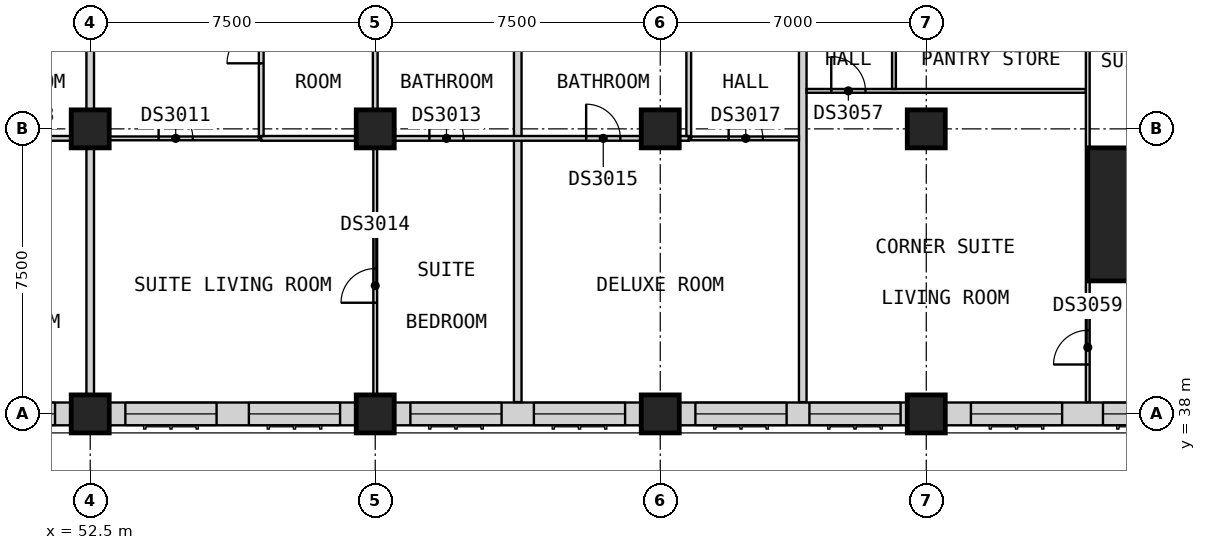
"""IFC4 building model, lengths in metres.
Left out: names, types, materials, properties, quantities, classifications, styles, units other than length and angle.
Written with IfcOpenShell. Run it as: python <this file> out.ifc"""

import sys

from ifc_helpers import new_model, si_unit, direction, frame, frame_2d, origin, origin_2d, place, context, subcontext, project, spatial, rectangle, extrude, element, fill, save


model = new_model("IFC4")
c1 = context("Model", 3, precision=1e-05, world=origin(), true_north=direction((0.0, 1.0)))
c2 = subcontext(c1, "Body", "Model", "MODEL_VIEW")
j1 = project(units=[si_unit("LENGTHUNIT", "METRE"), si_unit("PLANEANGLEUNIT", "RADIAN")], contexts=[c1])
p1 = place(None, origin())
s1 = spatial("IfcSite", under=j1, at=p1, CompositionType="ELEMENT")
p2 = place(p1, origin())
s2 = spatial("IfcBuilding", under=s1, at=p2, CompositionType="ELEMENT")
p3 = place(p2, frame((0.0, 0.0, 137.4)))
s3 = spatial("IfcBuildingStorey", under=s2, at=p3, CompositionType="ELEMENT", Elevation=137.4)
for number, where, z_axis, x_axis in (
    (1, (52.5, 38.0, 0.0), (0.0, 0.0, 1.0), (1.0, 0.0, 0.0)),
    (2, (52.5, 45.5, 0.0), (0.0, 0.0, 1.0), (1.0, 0.0, 0.0)),
    (3, (60.0, 38.0, 0.0), (0.0, 0.0, 1.0), (1.0, 0.0, 0.0)),
    (4, (60.0, 45.5, 0.0), (0.0, 0.0, 1.0), (1.0, 0.0, 0.0)),
    (5, (67.5, 38.0, 0.0), (0.0, 0.0, 1.0), (1.0, 0.0, 0.0)),
    (6, (67.5, 45.5, 0.0), (0.0, 0.0, 1.0), (1.0, 0.0, 0.0)),
    (7, (74.5, 38.0, 0.0), (0.0, 0.0, 1.0), (1.0, 0.0, 0.0)),
    (8, (74.5, 45.5, 0.0), (0.0, 0.0, 1.0), (1.0, 0.0, 0.0)),
):
    element("IfcColumn", number, at=place(p3, frame(where, z_axis=z_axis, x_axis=x_axis)), inside=s3, PredefinedType="COLUMN", context=c2, shape_type="SweptSolid", body=[
        extrude(rectangle(XDim=1.0, YDim=1.0, at=origin_2d()), origin(), (0.0, 0.0, 1.0), 3.6),
    ])
p4 = place(p3, frame((80.5, 43.25, 0.0), z_axis=(0.0, 0.0, 1.0), x_axis=(1.0, 0.0, 0.0)))
e9 = element("IfcColumn", 9, at=p4, inside=s3, PredefinedType="COLUMN", context=c2, shape_type="SweptSolid", body=[
    extrude(rectangle(XDim=3.5, YDim=3.5, at=origin_2d()), origin(), (0.0, 0.0, 1.0), 3.6),
])
p5 = place(p3, frame((45.5, 38.0, 0.0), z_axis=(0.0, 0.0, 1.0), x_axis=(1.0, 0.0, 0.0)))
e10 = element("IfcWall", 10, at=p5, inside=s3, PredefinedType="SOLIDWALL", context=c2, shape_type="SweptSolid", body=[
    extrude(rectangle(XDim=6.5, YDim=0.6, at=frame_2d((3.25, 0.0))), origin(), (0.0, 0.0, 1.0), 2.85),
])
p6 = place(p5, frame((0.425, 0.0, 0.8)))
e11 = element("IfcOpeningElement", 11, at=p6, cuts=e10, PredefinedType="OPENING", context=c2, shape_type="SweptSolid", body=[
    extrude(rectangle(XDim=2.4, YDim=1.8, at=frame_2d((1.2, 0.9))), frame((0.0, 0.31, 0.0), z_axis=(0.0, -1.0, 0.0), x_axis=(1.0, 0.0, 0.0)), (0.0, 0.0, 1.0), 0.62),
])
p7 = place(p5, frame((3.675, 0.0, 0.8)))
e12 = element("IfcOpeningElement", 12, at=p7, cuts=e10, PredefinedType="OPENING", context=c2, shape_type="SweptSolid", body=[
    extrude(rectangle(XDim=2.4, YDim=1.8, at=frame_2d((1.2, 0.9))), frame((0.0, 0.31, 0.0), z_axis=(0.0, -1.0, 0.0), x_axis=(1.0, 0.0, 0.0)), (0.0, 0.0, 1.0), 0.62),
])
p8 = place(p3, frame((53.0, 38.0, 0.0), z_axis=(0.0, 0.0, 1.0), x_axis=(1.0, 0.0, 0.0)))
e13 = element("IfcWall", 13, at=p8, inside=s3, PredefinedType="SOLIDWALL", context=c2, shape_type="SweptSolid", body=[
    extrude(rectangle(XDim=6.5, YDim=0.6, at=frame_2d((3.25, 0.0))), origin(), (0.0, 0.0, 1.0), 2.85),
])
p9 = place(p8, frame((0.425, 0.0, 0.8)))
e14 = element("IfcOpeningElement", 14, at=p9, cuts=e13, PredefinedType="OPENING", context=c2, shape_type="SweptSolid", body=[
    extrude(rectangle(XDim=2.4, YDim=1.8, at=frame_2d((1.2, 0.9))), frame((0.0, 0.31, 0.0), z_axis=(0.0, -1.0, 0.0), x_axis=(1.0, 0.0, 0.0)), (0.0, 0.0, 1.0), 0.62),
])
p10 = place(p8, frame((3.675, 0.0, 0.8)))
e15 = element("IfcOpeningElement", 15, at=p10, cuts=e13, PredefinedType="OPENING", context=c2, shape_type="SweptSolid", body=[
    extrude(rectangle(XDim=2.4, YDim=1.8, at=frame_2d((1.2, 0.9))), frame((0.0, 0.31, 0.0), z_axis=(0.0, -1.0, 0.0), x_axis=(1.0, 0.0, 0.0)), (0.0, 0.0, 1.0), 0.62),
])
p11 = place(p3, frame((60.5, 38.0, 0.0), z_axis=(0.0, 0.0, 1.0), x_axis=(1.0, 0.0, 0.0)))
e16 = element("IfcWall", 16, at=p11, inside=s3, PredefinedType="SOLIDWALL", context=c2, shape_type="SweptSolid", body=[
    extrude(rectangle(XDim=6.5, YDim=0.6, at=frame_2d((3.25, 0.0))), origin(), (0.0, 0.0, 1.0), 2.85),
])
p12 = place(p11, frame((0.425, 0.0, 0.8)))
e17 = element("IfcOpeningElement", 17, at=p12, cuts=e16, PredefinedType="OPENING", context=c2, shape_type="SweptSolid", body=[
    extrude(rectangle(XDim=2.4, YDim=1.8, at=frame_2d((1.2, 0.9))), frame((0.0, 0.31, 0.0), z_axis=(0.0, -1.0, 0.0), x_axis=(1.0, 0.0, 0.0)), (0.0, 0.0, 1.0), 0.62),
])
p13 = place(p11, frame((3.675, 0.0, 0.8)))
e18 = element("IfcOpeningElement", 18, at=p13, cuts=e16, PredefinedType="OPENING", context=c2, shape_type="SweptSolid", body=[
    extrude(rectangle(XDim=2.4, YDim=1.8, at=frame_2d((1.2, 0.9))), frame((0.0, 0.31, 0.0), z_axis=(0.0, -1.0, 0.0), x_axis=(1.0, 0.0, 0.0)), (0.0, 0.0, 1.0), 0.62),
])
p14 = place(p3, frame((68.0, 38.0, 0.0), z_axis=(0.0, 0.0, 1.0), x_axis=(1.0, 0.0, 0.0)))
e19 = element("IfcWall", 19, at=p14, inside=s3, PredefinedType="SOLIDWALL", context=c2, shape_type="SweptSolid", body=[
    extrude(rectangle(XDim=6.0, YDim=0.6, at=frame_2d((3.0, 0.0))), origin(), (0.0, 0.0, 1.0), 2.85),
])
p15 = place(p14, frame((0.425, 0.0, 0.8)))
e20 = element("IfcOpeningElement", 20, at=p15, cuts=e19, PredefinedType="OPENING", context=c2, shape_type="SweptSolid", body=[
    extrude(rectangle(XDim=2.4, YDim=1.8, at=frame_2d((1.2, 0.9))), frame((0.0, 0.31, 0.0), z_axis=(0.0, -1.0, 0.0), x_axis=(1.0, 0.0, 0.0)), (0.0, 0.0, 1.0), 0.62),
])
p16 = place(p14, frame((3.425, 0.0, 0.8)))
e21 = element("IfcOpeningElement", 21, at=p16, cuts=e19, PredefinedType="OPENING", context=c2, shape_type="SweptSolid", body=[
    extrude(rectangle(XDim=2.4, YDim=1.8, at=frame_2d((1.2, 0.9))), frame((0.0, 0.31, 0.0), z_axis=(0.0, -1.0, 0.0), x_axis=(1.0, 0.0, 0.0)), (0.0, 0.0, 1.0), 0.62),
])
p17 = place(p3, frame((75.0, 38.0, 0.0), z_axis=(0.0, 0.0, 1.0), x_axis=(1.0, 0.0, 0.0)))
e22 = element("IfcWall", 22, at=p17, inside=s3, PredefinedType="SOLIDWALL", context=c2, shape_type="SweptSolid", body=[
    extrude(rectangle(XDim=7.25, YDim=0.6, at=frame_2d((3.625, 0.0))), origin(), (0.0, 0.0, 1.0), 2.85),
])
p18 = place(p17, frame((0.675, 0.0, 0.8)))
e23 = element("IfcOpeningElement", 23, at=p18, cuts=e22, PredefinedType="OPENING", context=c2, shape_type="SweptSolid", body=[
    extrude(rectangle(XDim=2.4, YDim=1.8, at=frame_2d((1.2, 0.9))), frame((0.0, 0.31, 0.0), z_axis=(0.0, -1.0, 0.0), x_axis=(1.0, 0.0, 0.0)), (0.0, 0.0, 1.0), 0.62),
])
p19 = place(p17, frame((4.15, 0.0, 0.8)))
e24 = element("IfcOpeningElement", 24, at=p19, cuts=e22, PredefinedType="OPENING", context=c2, shape_type="SweptSolid", body=[
    extrude(rectangle(XDim=1.8, YDim=1.8, at=frame_2d((0.9, 0.9))), frame((0.0, 0.31, 0.0), z_axis=(0.0, -1.0, 0.0), x_axis=(1.0, 0.0, 0.0)), (0.0, 0.0, 1.0), 0.62),
])
p20 = place(p3, frame((52.5, 37.5, 0.0), z_axis=(0.0, 0.0, 1.0), x_axis=(0.0, 1.0, 0.0)))
e25 = element("IfcWall", 25, at=p20, inside=s3, PredefinedType="PARTITIONING", context=c2, shape_type="SweptSolid", body=[
    extrude(rectangle(XDim=12.525, YDim=0.2, at=frame_2d((6.262, 0.0))), origin(), (0.0, 0.0, 1.0), 3.35),
])
for number, where, z_axis, x_axis in (
    (26, (63.75, 38.31, 0.0), (0.0, 0.0, 1.0), (0.0, 1.0, 0.0)),
    (27, (71.25, 38.31, 0.0), (0.0, 0.0, 1.0), (0.0, 1.0, 0.0)),
):
    element("IfcWall", number, at=place(p3, frame(where, z_axis=z_axis, x_axis=x_axis)), inside=s3, PredefinedType="PARTITIONING", context=c2, shape_type="SweptSolid", body=[
        extrude(rectangle(XDim=11.715, YDim=0.2, at=frame_2d((5.857, 0.0))), origin(), (0.0, 0.0, 1.0), 3.35),
    ])
p21 = place(p3, frame((78.8, 42.0, 0.0), z_axis=(0.0, 0.0, 1.0), x_axis=(1.0, 0.0, 0.0)))
e28 = element("IfcWall", 28, at=p21, inside=s3, PredefinedType="PARTITIONING", context=c2, shape_type="SweptSolid", body=[
    extrude(rectangle(XDim=3.44, YDim=0.1, at=frame_2d((1.72, 0.0))), origin(), (0.0, 0.0, 1.0), 3.35),
])
p22 = place(p3, frame((52.6, 45.25, 0.0), z_axis=(0.0, 0.0, 1.0), x_axis=(1.0, 0.0, 0.0)))
e29 = element("IfcWall", 29, at=p22, inside=s3, PredefinedType="PARTITIONING", context=c2, shape_type="SweptSolid", body=[
    extrude(rectangle(XDim=4.337, YDim=0.1, at=frame_2d((2.169, 0.0))), origin(), (0.0, 0.0, 1.0), 3.35),
])
p23 = place(p22, frame((1.7, 0.0, 0.0)))
e30 = element("IfcOpeningElement", 30, at=p23, cuts=e29, PredefinedType="OPENING", context=c2, shape_type="SweptSolid", body=[
    extrude(rectangle(XDim=0.9, YDim=2.1, at=frame_2d((0.45, 1.05))), frame((0.0, 0.06, 0.0), z_axis=(0.0, -1.0, 0.0), x_axis=(1.0, 0.0, 0.0)), (0.0, 0.0, 1.0), 0.12),
])
p24 = place(p3, frame((68.312, 45.25, 0.0), z_axis=(0.0, 0.0, 1.0), x_axis=(1.0, 0.0, 0.0)))
e31 = element("IfcWall", 31, at=p24, inside=s3, PredefinedType="PARTITIONING", context=c2, shape_type="SweptSolid", body=[
    extrude(rectangle(XDim=2.837, YDim=0.1, at=frame_2d((1.419, 0.0))), origin(), (0.0, 0.0, 1.0), 3.35),
])
p25 = place(p24, frame((0.988, 0.0, 0.0)))
e32 = element("IfcOpeningElement", 32, at=p25, cuts=e31, PredefinedType="OPENING", context=c2, shape_type="SweptSolid", body=[
    extrude(rectangle(XDim=0.9, YDim=2.1, at=frame_2d((0.45, 1.05))), frame((0.0, 0.06, 0.0), z_axis=(0.0, -1.0, 0.0), x_axis=(1.0, 0.0, 0.0)), (0.0, 0.0, 1.0), 0.12),
])
p26 = place(p3, frame((71.35, 46.5, 0.0), z_axis=(0.0, 0.0, 1.0), x_axis=(1.0, 0.0, 0.0)))
e33 = element("IfcWall", 33, at=p26, inside=s3, PredefinedType="PARTITIONING", context=c2, shape_type="SweptSolid", body=[
    extrude(rectangle(XDim=7.35, YDim=0.1, at=frame_2d((3.675, 0.0))), origin(), (0.0, 0.0, 1.0), 3.35),
])
p27 = place(p26, frame((0.65, 0.0, 0.0)))
e34 = element("IfcOpeningElement", 34, at=p27, cuts=e33, PredefinedType="OPENING", context=c2, shape_type="SweptSolid", body=[
    extrude(rectangle(XDim=0.9, YDim=2.1, at=frame_2d((0.45, 1.05))), frame((0.0, 0.06, 0.0), z_axis=(0.0, -1.0, 0.0), x_axis=(1.0, 0.0, 0.0)), (0.0, 0.0, 1.0), 0.12),
])
p28 = place(p3, frame((60.0, 37.5, 0.0), z_axis=(0.0, 0.0, 1.0), x_axis=(0.0, 1.0, 0.0)))
e35 = element("IfcWall", 35, at=p28, inside=s3, PredefinedType="PARTITIONING", context=c2, shape_type="SweptSolid", body=[
    extrude(rectangle(XDim=7.688, YDim=0.1, at=frame_2d((3.844, 0.0))), origin(), (0.0, 0.0, 1.0), 3.35),
])
p29 = place(p28, frame((3.425, 0.0, 0.0)))
e36 = element("IfcOpeningElement", 36, at=p29, cuts=e35, PredefinedType="OPENING", context=c2, shape_type="SweptSolid", body=[
    extrude(rectangle(XDim=0.9, YDim=2.1, at=frame_2d((0.45, 1.05))), frame((0.0, 0.06, 0.0), z_axis=(0.0, -1.0, 0.0), x_axis=(1.0, 0.0, 0.0)), (0.0, 0.0, 1.0), 0.12),
])
p30 = place(p3, frame((73.65, 46.55, 0.0), z_axis=(0.0, 0.0, 1.0), x_axis=(0.0, 1.0, 0.0)))
e37 = element("IfcWall", 37, at=p30, inside=s3, PredefinedType="PARTITIONING", context=c2, shape_type="SweptSolid", body=[
    extrude(rectangle(XDim=3.475, YDim=0.1, at=frame_2d((1.737, 0.0))), origin(), (0.0, 0.0, 1.0), 3.35),
])
p31 = place(p30, frame((1.3, 0.0, 0.0)))
e38 = element("IfcOpeningElement", 38, at=p31, cuts=e37, PredefinedType="OPENING", context=c2, shape_type="SweptSolid", body=[
    extrude(rectangle(XDim=0.9, YDim=2.1, at=frame_2d((0.45, 1.05))), frame((0.0, 0.06, 0.0), z_axis=(0.0, -1.0, 0.0), x_axis=(1.0, 0.0, 0.0)), (0.0, 0.0, 1.0), 0.12),
])
p32 = place(p3, frame((78.75, 38.31, 0.0), z_axis=(0.0, 0.0, 1.0), x_axis=(0.0, 1.0, 0.0)))
e39 = element("IfcWall", 39, at=p32, inside=s3, PredefinedType="PARTITIONING", context=c2, shape_type="SweptSolid", body=[
    extrude(rectangle(XDim=11.728, YDim=0.1, at=frame_2d((5.864, 0.0))), origin(), (0.0, 0.0, 1.0), 3.35),
])
p33 = place(p32, frame((0.99, 0.0, 0.0)))
e40 = element("IfcOpeningElement", 40, at=p33, cuts=e39, PredefinedType="OPENING", context=c2, shape_type="SweptSolid", body=[
    extrude(rectangle(XDim=0.9, YDim=2.1, at=frame_2d((0.45, 1.05))), frame((0.0, 0.06, 0.0), z_axis=(0.0, -1.0, 0.0), x_axis=(1.0, 0.0, 0.0)), (0.0, 0.0, 1.0), 0.12),
])
p34 = place(p32, frame((9.54, 0.0, 0.0)))
e41 = element("IfcOpeningElement", 41, at=p34, cuts=e39, PredefinedType="OPENING", context=c2, shape_type="SweptSolid", body=[
    extrude(rectangle(XDim=0.9, YDim=2.1, at=frame_2d((0.45, 1.05))), frame((0.0, 0.06, 0.0), z_axis=(0.0, -1.0, 0.0), x_axis=(1.0, 0.0, 0.0)), (0.0, 0.0, 1.0), 0.12),
])
p35 = place(p3, frame((45.75, 45.25, 0.0), z_axis=(0.0, 0.0, 1.0), x_axis=(1.0, 0.0, 0.0)))
e42 = element("IfcWall", 42, at=p35, inside=s3, PredefinedType="PARTITIONING", context=c2, shape_type="SweptSolid", body=[
    extrude(rectangle(XDim=6.65, YDim=0.125, at=frame_2d((3.325, 0.0))), origin(), (0.0, 0.0, 1.0), 3.35),
])
p36 = place(p35, frame((4.425, 0.0, 0.0)))
e43 = element("IfcOpeningElement", 43, at=p36, cuts=e42, PredefinedType="OPENING", context=c2, shape_type="SweptSolid", body=[
    extrude(rectangle(XDim=0.9, YDim=2.1, at=frame_2d((0.45, 1.05))), frame((0.0, 0.073, 0.0), z_axis=(0.0, -1.0, 0.0), x_axis=(1.0, 0.0, 0.0)), (0.0, 0.0, 1.0), 0.145),
])
p37 = place(p3, frame((57.0, 45.25, 0.0), z_axis=(0.0, 0.0, 1.0), x_axis=(1.0, 0.0, 0.0)))
e44 = element("IfcWall", 44, at=p37, inside=s3, PredefinedType="PARTITIONING", context=c2, shape_type="SweptSolid", body=[
    extrude(rectangle(XDim=11.25, YDim=0.125, at=frame_2d((5.625, 0.0))), origin(), (0.0, 0.0, 1.0), 3.35),
])
p38 = place(p37, frame((4.425, 0.0, 0.0)))
e45 = element("IfcOpeningElement", 45, at=p38, cuts=e44, PredefinedType="OPENING", context=c2, shape_type="SweptSolid", body=[
    extrude(rectangle(XDim=0.9, YDim=2.1, at=frame_2d((0.45, 1.05))), frame((0.0, 0.073, 0.0), z_axis=(0.0, -1.0, 0.0), x_axis=(1.0, 0.0, 0.0)), (0.0, 0.0, 1.0), 0.145),
])
p39 = place(p37, frame((8.55, 0.0, 0.0)))
e46 = element("IfcOpeningElement", 46, at=p39, cuts=e44, PredefinedType="OPENING", context=c2, shape_type="SweptSolid", body=[
    extrude(rectangle(XDim=0.9, YDim=2.1, at=frame_2d((0.45, 1.05))), frame((0.0, 0.073, 0.0), z_axis=(0.0, -1.0, 0.0), x_axis=(1.0, 0.0, 0.0)), (0.0, 0.0, 1.0), 0.145),
])
p40 = place(p3, frame((57.0, 45.312, 0.0), z_axis=(0.0, 0.0, 1.0), x_axis=(0.0, 1.0, 0.0)))
e47 = element("IfcWall", 47, at=p40, inside=s3, PredefinedType="PARTITIONING", context=c2, shape_type="SweptSolid", body=[
    extrude(rectangle(XDim=4.712, YDim=0.125, at=frame_2d((2.356, 0.0))), origin(), (0.0, 0.0, 1.0), 3.35),
])
p41 = place(p40, frame((1.913, 0.0, 0.0)))
e48 = element("IfcOpeningElement", 48, at=p41, cuts=e47, PredefinedType="OPENING", context=c2, shape_type="SweptSolid", body=[
    extrude(rectangle(XDim=0.9, YDim=2.1, at=frame_2d((0.45, 1.05))), frame((0.0, 0.073, 0.0), z_axis=(0.0, -1.0, 0.0), x_axis=(1.0, 0.0, 0.0)), (0.0, 0.0, 1.0), 0.145),
])
for number, where, z_axis, x_axis in (
    (49, (60.0, 45.312, 0.0), (0.0, 0.0, 1.0), (0.0, 1.0, 0.0)),
    (50, (68.25, 45.312, 0.0), (0.0, 0.0, 1.0), (0.0, 1.0, 0.0)),
):
    element("IfcWall", number, at=place(p3, frame(where, z_axis=z_axis, x_axis=x_axis)), inside=s3, PredefinedType="PARTITIONING", context=c2, shape_type="SweptSolid", body=[
        extrude(rectangle(XDim=4.712, YDim=0.125, at=frame_2d((2.356, 0.0))), origin(), (0.0, 0.0, 1.0), 3.35),
    ])
p42 = place(p7, origin())
e51 = element("IfcWindow", 51, at=p42, inside=s3, PartitioningType="SINGLE_PANEL", PredefinedType="WINDOW", context=c2, shape_type="SweptSolid", body=[
    extrude(rectangle(XDim=2.4, YDim=1.8, at=frame_2d((1.2, 0.9))), frame((0.0, -0.07, 0.0), z_axis=(0.0, -1.0, 0.0), x_axis=(1.0, 0.0, 0.0)), (0.0, 0.0, 1.0), 0.06),
])
fill(e12, e51)
p43 = place(p9, origin())
e52 = element("IfcWindow", 52, at=p43, inside=s3, PartitioningType="SINGLE_PANEL", PredefinedType="WINDOW", context=c2, shape_type="SweptSolid", body=[
    extrude(rectangle(XDim=2.4, YDim=1.8, at=frame_2d((1.2, 0.9))), frame((0.0, -0.07, 0.0), z_axis=(0.0, -1.0, 0.0), x_axis=(1.0, 0.0, 0.0)), (0.0, 0.0, 1.0), 0.06),
])
fill(e14, e52)
p44 = place(p10, origin())
e53 = element("IfcWindow", 53, at=p44, inside=s3, PartitioningType="SINGLE_PANEL", PredefinedType="WINDOW", context=c2, shape_type="SweptSolid", body=[
    extrude(rectangle(XDim=2.4, YDim=1.8, at=frame_2d((1.2, 0.9))), frame((0.0, -0.07, 0.0), z_axis=(0.0, -1.0, 0.0), x_axis=(1.0, 0.0, 0.0)), (0.0, 0.0, 1.0), 0.06),
])
fill(e15, e53)
p45 = place(p12, origin())
e54 = element("IfcWindow", 54, at=p45, inside=s3, PartitioningType="SINGLE_PANEL", PredefinedType="WINDOW", context=c2, shape_type="SweptSolid", body=[
    extrude(rectangle(XDim=2.4, YDim=1.8, at=frame_2d((1.2, 0.9))), frame((0.0, -0.07, 0.0), z_axis=(0.0, -1.0, 0.0), x_axis=(1.0, 0.0, 0.0)), (0.0, 0.0, 1.0), 0.06),
])
fill(e17, e54)
p46 = place(p13, origin())
e55 = element("IfcWindow", 55, at=p46, inside=s3, PartitioningType="SINGLE_PANEL", PredefinedType="WINDOW", context=c2, shape_type="SweptSolid", body=[
    extrude(rectangle(XDim=2.4, YDim=1.8, at=frame_2d((1.2, 0.9))), frame((0.0, -0.07, 0.0), z_axis=(0.0, -1.0, 0.0), x_axis=(1.0, 0.0, 0.0)), (0.0, 0.0, 1.0), 0.06),
])
fill(e18, e55)
p47 = place(p15, origin())
e56 = element("IfcWindow", 56, at=p47, inside=s3, PartitioningType="SINGLE_PANEL", PredefinedType="WINDOW", context=c2, shape_type="SweptSolid", body=[
    extrude(rectangle(XDim=2.4, YDim=1.8, at=frame_2d((1.2, 0.9))), frame((0.0, -0.07, 0.0), z_axis=(0.0, -1.0, 0.0), x_axis=(1.0, 0.0, 0.0)), (0.0, 0.0, 1.0), 0.06),
])
fill(e20, e56)
p48 = place(p16, origin())
e57 = element("IfcWindow", 57, at=p48, inside=s3, PartitioningType="SINGLE_PANEL", PredefinedType="WINDOW", context=c2, shape_type="SweptSolid", body=[
    extrude(rectangle(XDim=2.4, YDim=1.8, at=frame_2d((1.2, 0.9))), frame((0.0, -0.07, 0.0), z_axis=(0.0, -1.0, 0.0), x_axis=(1.0, 0.0, 0.0)), (0.0, 0.0, 1.0), 0.06),
])
fill(e21, e57)
p49 = place(p18, origin())
e58 = element("IfcWindow", 58, at=p49, inside=s3, PartitioningType="SINGLE_PANEL", PredefinedType="WINDOW", context=c2, shape_type="SweptSolid", body=[
    extrude(rectangle(XDim=2.4, YDim=1.8, at=frame_2d((1.2, 0.9))), frame((0.0, -0.07, 0.0), z_axis=(0.0, -1.0, 0.0), x_axis=(1.0, 0.0, 0.0)), (0.0, 0.0, 1.0), 0.06),
])
fill(e23, e58)
p50 = place(p19, origin())
e59 = element("IfcWindow", 59, at=p50, inside=s3, PartitioningType="SINGLE_PANEL", PredefinedType="WINDOW", context=c2, shape_type="SweptSolid", body=[
    extrude(rectangle(XDim=1.8, YDim=1.8, at=frame_2d((0.9, 0.9))), frame((0.0, -0.07, 0.0), z_axis=(0.0, -1.0, 0.0), x_axis=(1.0, 0.0, 0.0)), (0.0, 0.0, 1.0), 0.06),
])
fill(e24, e59)
p51 = place(p23, origin())
e60 = element("IfcDoor", 60, at=p51, inside=s3, OperationType="SINGLE_SWING_LEFT", PredefinedType="DOOR", context=c2, shape_type="SweptSolid", body=[
    extrude(rectangle(XDim=0.9, YDim=2.1, at=frame_2d((0.45, 1.05))), frame((0.0, 0.025, 0.0), z_axis=(0.0, -1.0, 0.0), x_axis=(1.0, 0.0, 0.0)), (0.0, 0.0, 1.0), 0.05),
])
fill(e30, e60)
p52 = place(p41, origin())
e61 = element("IfcDoor", 61, at=p52, inside=s3, OperationType="SINGLE_SWING_LEFT", PredefinedType="DOOR", context=c2, shape_type="SweptSolid", body=[
    extrude(rectangle(XDim=0.9, YDim=2.1, at=frame_2d((0.45, 1.05))), frame((0.0, 0.025, 0.0), z_axis=(0.0, -1.0, 0.0), x_axis=(1.0, 0.0, 0.0)), (0.0, 0.0, 1.0), 0.05),
])
fill(e48, e61)
p53 = place(p38, origin())
e62 = element("IfcDoor", 62, at=p53, inside=s3, OperationType="SINGLE_SWING_LEFT", PredefinedType="DOOR", context=c2, shape_type="SweptSolid", body=[
    extrude(rectangle(XDim=0.9, YDim=2.1, at=frame_2d((0.45, 1.05))), frame((0.0, 0.025, 0.0), z_axis=(0.0, -1.0, 0.0), x_axis=(1.0, 0.0, 0.0)), (0.0, 0.0, 1.0), 0.05),
])
fill(e45, e62)
p54 = place(p29, origin())
e63 = element("IfcDoor", 63, at=p54, inside=s3, OperationType="SINGLE_SWING_LEFT", PredefinedType="DOOR", context=c2, shape_type="SweptSolid", body=[
    extrude(rectangle(XDim=0.9, YDim=2.1, at=frame_2d((0.45, 1.05))), frame((0.0, 0.025, 0.0), z_axis=(0.0, -1.0, 0.0), x_axis=(1.0, 0.0, 0.0)), (0.0, 0.0, 1.0), 0.05),
])
fill(e36, e63)
p55 = place(p39, origin())
e64 = element("IfcDoor", 64, at=p55, inside=s3, OperationType="SINGLE_SWING_LEFT", PredefinedType="DOOR", context=c2, shape_type="SweptSolid", body=[
    extrude(rectangle(XDim=0.9, YDim=2.1, at=frame_2d((0.45, 1.05))), frame((0.0, 0.025, 0.0), z_axis=(0.0, -1.0, 0.0), x_axis=(1.0, 0.0, 0.0)), (0.0, 0.0, 1.0), 0.05),
])
fill(e46, e64)
p56 = place(p25, origin())
e65 = element("IfcDoor", 65, at=p56, inside=s3, OperationType="SINGLE_SWING_LEFT", PredefinedType="DOOR", context=c2, shape_type="SweptSolid", body=[
    extrude(rectangle(XDim=0.9, YDim=2.1, at=frame_2d((0.45, 1.05))), frame((0.0, 0.025, 0.0), z_axis=(0.0, -1.0, 0.0), x_axis=(1.0, 0.0, 0.0)), (0.0, 0.0, 1.0), 0.05),
])
fill(e32, e65)
p57 = place(p27, origin())
e66 = element("IfcDoor", 66, at=p57, inside=s3, OperationType="SINGLE_SWING_RIGHT", PredefinedType="DOOR", context=c2, shape_type="SweptSolid", body=[
    extrude(rectangle(XDim=0.9, YDim=2.1, at=frame_2d((0.45, 1.05))), frame((0.0, 0.025, 0.0), z_axis=(0.0, -1.0, 0.0), x_axis=(1.0, 0.0, 0.0)), (0.0, 0.0, 1.0), 0.05),
])
fill(e34, e66)
p58 = place(p33, origin())
e67 = element("IfcDoor", 67, at=p58, inside=s3, OperationType="SINGLE_SWING_LEFT", PredefinedType="DOOR", context=c2, shape_type="SweptSolid", body=[
    extrude(rectangle(XDim=0.9, YDim=2.1, at=frame_2d((0.45, 1.05))), frame((0.0, 0.025, 0.0), z_axis=(0.0, -1.0, 0.0), x_axis=(1.0, 0.0, 0.0)), (0.0, 0.0, 1.0), 0.05),
])
fill(e40, e67)
save(model, sys.argv[1])
